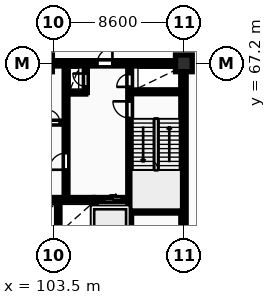
"""IFC4 building model, lengths in metres.
Left out: names, types, materials, properties, quantities, classifications, styles, units other than length and angle.
Written with IfcOpenShell. Run it as: python <this file> out.ifc"""

import sys

from ifc_helpers import new_model, si_unit, direction, frame, frame_2d, origin, origin_2d, place, context, subcontext, project, spatial, rectangle, extrude, element, fill, save


model = new_model("IFC4")
c1 = context("Model", 3, precision=1e-05, world=origin(), true_north=direction((0.0, 1.0)))
c2 = subcontext(c1, "Body", "Model", "MODEL_VIEW")
j1 = project(units=[si_unit("LENGTHUNIT", "METRE"), si_unit("PLANEANGLEUNIT", "RADIAN")], contexts=[c1])
p1 = place(None, origin())
s1 = spatial("IfcSite", under=j1, at=p1, CompositionType="ELEMENT")
p2 = place(p1, origin())
s2 = spatial("IfcBuilding", under=s1, at=p2, CompositionType="ELEMENT")
p3 = place(p2, frame((0.0, 0.0, 5.4)))
s3 = spatial("IfcBuildingStorey", under=s2, at=p3, CompositionType="ELEMENT", Elevation=5.4)
p4 = place(p3, frame((112.1, 67.2, 0.0), z_axis=(0.0, 0.0, 1.0), x_axis=(1.0, 0.0, 0.0)))
e1 = element("IfcColumn", 1, at=p4, inside=s3, PredefinedType="COLUMN", context=c2, shape_type="SweptSolid", body=[
    extrude(rectangle(XDim=1.1, YDim=1.1, at=origin_2d()), origin(), (0.0, 0.0, 1.0), 4.6),
])
p5 = place(p3, frame((112.075, 55.375, 0.0), z_axis=(0.0, 0.0, 1.0), x_axis=(0.0, 1.0, 0.0)))
e2 = element("IfcWall", 2, at=p5, inside=s3, PredefinedType="SHEAR", context=c2, shape_type="SweptSolid", body=[
    extrude(rectangle(XDim=11.65, YDim=0.35, at=frame_2d((5.825, 0.0))), origin(), (0.0, 0.0, 1.0), 4.6),
])
p6 = place(p3, frame((75.95, 67.2, 0.0), z_axis=(0.0, 0.0, 1.0), x_axis=(1.0, 0.0, 0.0)))
e3 = element("IfcWall", 3, at=p6, inside=s3, PredefinedType="SHEAR", context=c2, shape_type="SweptSolid", body=[
    extrude(rectangle(XDim=36.3, YDim=0.35, at=frame_2d((18.15, 0.0))), origin(), (0.0, 0.0, 1.0), 4.6),
])
p7 = place(p6, frame((5.25, 0.0, 0.0)))
e4 = element("IfcOpeningElement", 4, at=p7, cuts=e3, PredefinedType="OPENING", context=c2, shape_type="SweptSolid", body=[
    extrude(rectangle(XDim=1.0, YDim=2.15, at=frame_2d((0.5, 1.075))), frame((0.0, 0.185, 0.0), z_axis=(0.0, -1.0, 0.0), x_axis=(1.0, 0.0, 0.0)), (0.0, 0.0, 1.0), 0.37),
])
p8 = place(p6, frame((22.058, 0.0, 0.0)))
e5 = element("IfcOpeningElement", 5, at=p8, cuts=e3, PredefinedType="OPENING", context=c2, shape_type="SweptSolid", body=[
    extrude(rectangle(XDim=1.5, YDim=2.2, at=frame_2d((0.75, 1.1))), frame((0.0, 0.185, 0.0), z_axis=(0.0, -1.0, 0.0), x_axis=(1.0, 0.0, 0.0)), (0.0, 0.0, 1.0), 0.37),
])
p9 = place(p6, frame((30.45, 0.0, 0.0)))
e6 = element("IfcOpeningElement", 6, at=p9, cuts=e3, PredefinedType="OPENING", context=c2, shape_type="SweptSolid", body=[
    extrude(rectangle(XDim=1.0, YDim=2.15, at=frame_2d((0.5, 1.075))), frame((0.0, 0.185, 0.0), z_axis=(0.0, -1.0, 0.0), x_axis=(1.0, 0.0, 0.0)), (0.0, 0.0, 1.0), 0.37),
])
p10 = place(p3, frame((103.85, 55.4, 0.0), z_axis=(0.0, 0.0, 1.0), x_axis=(0.0, 1.0, 0.0)))
e7 = element("IfcWall", 7, at=p10, inside=s3, PredefinedType="PARTITIONING", context=c2, shape_type="SweptSolid", body=[
    extrude(rectangle(XDim=2.72, YDim=0.2, at=frame_2d((1.36, 0.0))), origin(), (0.0, 0.0, 1.0), 4.3),
])
p11 = place(p3, frame((101.55, 58.25, 0.0), z_axis=(0.0, 0.0, 1.0), x_axis=(1.0, 0.0, 0.0)))
e8 = element("IfcWall", 8, at=p11, inside=s3, PredefinedType="SHEAR", context=c2, shape_type="SweptSolid", body=[
    extrude(rectangle(XDim=4.6, YDim=0.25, at=frame_2d((2.3, 0.0))), origin(), (0.0, 0.0, 1.0), 4.6),
])
p12 = place(p3, frame((106.22, 55.4, 0.0), z_axis=(0.0, 0.0, 1.0), x_axis=(0.0, 1.0, 0.0)))
e9 = element("IfcWall", 9, at=p12, inside=s3, PredefinedType="SHEAR", context=c2, shape_type="SweptSolid", body=[
    extrude(rectangle(XDim=2.85, YDim=0.25, at=frame_2d((1.425, 0.0))), origin(), (0.0, 0.0, 1.0), 4.6),
])
p13 = place(p3, frame((106.22, 58.25, 0.0), z_axis=(0.0, 0.0, 1.0), x_axis=(1.0, 0.0, 0.0)))
e10 = element("IfcWall", 10, at=p13, inside=s3, PredefinedType="SHEAR", context=c2, shape_type="SweptSolid", body=[
    extrude(rectangle(XDim=2.46, YDim=0.25, at=frame_2d((1.23, 0.0))), origin(), (0.0, 0.0, 1.0), 4.6),
])
p14 = place(p13, frame((0.67, 0.0, 0.0)))
e11 = element("IfcOpeningElement", 11, at=p14, cuts=e10, PredefinedType="OPENING", context=c2, shape_type="SweptSolid", body=[
    extrude(rectangle(XDim=1.12, YDim=2.12, at=frame_2d((0.56, 1.06))), frame((0.0, 0.135, 0.0), z_axis=(0.0, -1.0, 0.0), x_axis=(1.0, 0.0, 0.0)), (0.0, 0.0, 1.0), 0.27),
])
p15 = place(p3, frame((84.42, 63.3, 0.0), z_axis=(0.0, 0.0, 1.0), x_axis=(1.0, 0.0, 0.0)))
e12 = element("IfcWall", 12, at=p15, inside=s3, PredefinedType="PARTITIONING", context=c2, shape_type="SweptSolid", body=[
    extrude(rectangle(XDim=19.83, YDim=0.2, at=frame_2d((9.915, 0.0))), origin(), (0.0, 0.0, 1.0), 4.3),
])
p16 = place(p15, frame((1.15, 0.0, 0.0)))
e13 = element("IfcOpeningElement", 13, at=p16, cuts=e12, PredefinedType="OPENING", context=c2, shape_type="SweptSolid", body=[
    extrude(rectangle(XDim=0.85, YDim=2.05, at=frame_2d((0.425, 1.025))), frame((0.0, 0.11, 0.0), z_axis=(0.0, -1.0, 0.0), x_axis=(1.0, 0.0, 0.0)), (0.0, 0.0, 1.0), 0.22),
])
p17 = place(p15, frame((3.25, 0.0, 0.0)))
e14 = element("IfcOpeningElement", 14, at=p17, cuts=e12, PredefinedType="OPENING", context=c2, shape_type="SweptSolid", body=[
    extrude(rectangle(XDim=0.85, YDim=2.05, at=frame_2d((0.425, 1.025))), frame((0.0, 0.11, 0.0), z_axis=(0.0, -1.0, 0.0), x_axis=(1.0, 0.0, 0.0)), (0.0, 0.0, 1.0), 0.22),
])
p18 = place(p15, frame((13.08, 0.0, 0.0)))
e15 = element("IfcOpeningElement", 15, at=p18, cuts=e12, PredefinedType="OPENING", context=c2, shape_type="SweptSolid", body=[
    extrude(rectangle(XDim=1.5, YDim=2.2, at=frame_2d((0.75, 1.1))), frame((0.0, 0.11, 0.0), z_axis=(0.0, -1.0, 0.0), x_axis=(1.0, 0.0, 0.0)), (0.0, 0.0, 1.0), 0.22),
])
p19 = place(p15, frame((5.53, 0.0, 0.0)))
e16 = element("IfcOpeningElement", 16, at=p19, cuts=e12, PredefinedType="OPENING", context=c2, shape_type="SweptSolid", body=[
    extrude(rectangle(XDim=0.88, YDim=2.06, at=frame_2d((0.44, 1.03))), frame((0.0, 0.11, 0.0), z_axis=(0.0, -1.0, 0.0), x_axis=(1.0, 0.0, 0.0)), (0.0, 0.0, 1.0), 0.22),
])
p20 = place(p15, frame((7.68, 0.0, 0.0)))
e17 = element("IfcOpeningElement", 17, at=p20, cuts=e12, PredefinedType="OPENING", context=c2, shape_type="SweptSolid", body=[
    extrude(rectangle(XDim=0.88, YDim=2.06, at=frame_2d((0.44, 1.03))), frame((0.0, 0.11, 0.0), z_axis=(0.0, -1.0, 0.0), x_axis=(1.0, 0.0, 0.0)), (0.0, 0.0, 1.0), 0.22),
])
p21 = place(p15, frame((10.43, 0.0, 0.0)))
e18 = element("IfcOpeningElement", 18, at=p21, cuts=e12, PredefinedType="OPENING", context=c2, shape_type="SweptSolid", body=[
    extrude(rectangle(XDim=0.85, YDim=2.05, at=frame_2d((0.425, 1.025))), frame((0.0, 0.11, 0.0), z_axis=(0.0, -1.0, 0.0), x_axis=(1.0, 0.0, 0.0)), (0.0, 0.0, 1.0), 0.22),
])
p22 = place(p15, frame((16.23, 0.0, 0.0)))
e19 = element("IfcOpeningElement", 19, at=p22, cuts=e12, PredefinedType="OPENING", context=c2, shape_type="SweptSolid", body=[
    extrude(rectangle(XDim=0.96, YDim=2.1, at=frame_2d((0.48, 1.05))), frame((0.0, 0.11, 0.0), z_axis=(0.0, -1.0, 0.0), x_axis=(1.0, 0.0, 0.0)), (0.0, 0.0, 1.0), 0.22),
])
p23 = place(p15, frame((18.68, 0.0, 0.0)))
e20 = element("IfcOpeningElement", 20, at=p23, cuts=e12, PredefinedType="OPENING", context=c2, shape_type="SweptSolid", body=[
    extrude(rectangle(XDim=0.84, YDim=2.04, at=frame_2d((0.42, 1.02))), frame((0.0, 0.11, 0.0), z_axis=(0.0, -1.0, 0.0), x_axis=(1.0, 0.0, 0.0)), (0.0, 0.0, 1.0), 0.22),
])
p24 = place(p3, frame((104.45, 65.28, 0.0), z_axis=(0.0, 0.0, 1.0), x_axis=(1.0, 0.0, 0.0)))
e21 = element("IfcWall", 21, at=p24, inside=s3, PredefinedType="PARTITIONING", context=c2, shape_type="SweptSolid", body=[
    extrude(rectangle(XDim=1.2, YDim=0.2, at=frame_2d((0.6, 0.0))), origin(), (0.0, 0.0, 1.0), 4.3),
])
p25 = place(p3, frame((105.65, 65.28, 0.0), z_axis=(0.0, 0.0, 1.0), x_axis=(0.0, 1.0, 0.0)))
e22 = element("IfcWall", 22, at=p25, inside=s3, PredefinedType="PARTITIONING", context=c2, shape_type="SweptSolid", body=[
    extrude(rectangle(XDim=1.72, YDim=0.2, at=frame_2d((0.86, 0.0))), origin(), (0.0, 0.0, 1.0), 4.3),
])
p26 = place(p25, frame((0.4, 0.0, 0.0)))
e23 = element("IfcOpeningElement", 23, at=p26, cuts=e22, PredefinedType="OPENING", context=c2, shape_type="SweptSolid", body=[
    extrude(rectangle(XDim=0.85, YDim=2.05, at=frame_2d((0.425, 1.025))), frame((0.0, 0.11, 0.0), z_axis=(0.0, -1.0, 0.0), x_axis=(1.0, 0.0, 0.0)), (0.0, 0.0, 1.0), 0.22),
])
p27 = place(p3, frame((104.35, 58.4, 0.0), z_axis=(0.0, 0.0, 1.0), x_axis=(0.0, 1.0, 0.0)))
e24 = element("IfcWall", 24, at=p27, inside=s3, PredefinedType="SHEAR", context=c2, shape_type="SweptSolid", body=[
    extrude(rectangle(XDim=8.6, YDim=0.25, at=frame_2d((4.3, 0.0))), origin(), (0.0, 0.0, 1.0), 4.6),
])
p28 = place(p27, frame((1.8, 0.0, 0.0)))
e25 = element("IfcOpeningElement", 25, at=p28, cuts=e24, PredefinedType="OPENING", context=c2, shape_type="SweptSolid", body=[
    extrude(rectangle(XDim=1.1, YDim=2.1, at=frame_2d((0.55, 1.05))), frame((0.0, 0.135, 0.0), z_axis=(0.0, -1.0, 0.0), x_axis=(1.0, 0.0, 0.0)), (0.0, 0.0, 1.0), 0.27),
])
p29 = place(p3, frame((108.535, 55.4, 0.0), z_axis=(0.0, 0.0, 1.0), x_axis=(0.0, 1.0, 0.0)))
e26 = element("IfcWall", 26, at=p29, inside=s3, PredefinedType="SHEAR", context=c2, shape_type="SweptSolid", body=[
    extrude(rectangle(XDim=11.6, YDim=0.25, at=frame_2d((5.8, 0.0))), origin(), (0.0, 0.0, 1.0), 4.6),
])
p30 = place(p29, frame((8.2, 0.0, 0.0)))
e27 = element("IfcOpeningElement", 27, at=p30, cuts=e26, PredefinedType="OPENING", context=c2, shape_type="SweptSolid", body=[
    extrude(rectangle(XDim=1.1, YDim=2.1, at=frame_2d((0.55, 1.05))), frame((0.0, 0.135, 0.0), z_axis=(0.0, -1.0, 0.0), x_axis=(1.0, 0.0, 0.0)), (0.0, 0.0, 1.0), 0.27),
])
p31 = place(p29, frame((10.25, 0.0, 0.0)))
e28 = element("IfcOpeningElement", 28, at=p31, cuts=e26, PredefinedType="OPENING", context=c2, shape_type="SweptSolid", body=[
    extrude(rectangle(XDim=0.85, YDim=2.05, at=frame_2d((0.425, 1.025))), frame((0.0, 0.135, 0.0), z_axis=(0.0, -1.0, 0.0), x_axis=(1.0, 0.0, 0.0)), (0.0, 0.0, 1.0), 0.27),
])
for number, where, z_axis, x_axis in (
    (29, (108.66, 57.475, 0.0), (0.0, 0.0, 1.0), (1.0, 0.0, 0.0)),
    (30, (108.66, 65.325, 0.0), (0.0, 0.0, 1.0), (1.0, 0.0, 0.0)),
):
    element("IfcWall", number, at=place(p3, frame(where, z_axis=z_axis, x_axis=x_axis)), inside=s3, PredefinedType="SHEAR", context=c2, shape_type="SweptSolid", body=[
        extrude(rectangle(XDim=3.24, YDim=0.25, at=frame_2d((1.62, 0.0))), origin(), (0.0, 0.0, 1.0), 4.6),
    ])
p32 = place(p9, origin())
e31 = element("IfcDoor", 31, at=p32, inside=s3, OperationType="SINGLE_SWING_RIGHT", PredefinedType="DOOR", context=c2, shape_type="SweptSolid", body=[
    extrude(rectangle(XDim=1.0, YDim=2.15, at=frame_2d((0.5, 1.075))), frame((0.0, 0.025, 0.0), z_axis=(0.0, -1.0, 0.0), x_axis=(1.0, 0.0, 0.0)), (0.0, 0.0, 1.0), 0.05),
])
fill(e6, e31)
p33 = place(p14, origin())
e32 = element("IfcDoor", 32, at=p33, inside=s3, OperationType="SLIDING_TO_RIGHT", PredefinedType="DOOR", context=c2, shape_type="SweptSolid", body=[
    extrude(rectangle(XDim=1.12, YDim=2.12, at=frame_2d((0.56, 1.06))), frame((0.0, 0.025, 0.0), z_axis=(0.0, -1.0, 0.0), x_axis=(1.0, 0.0, 0.0)), (0.0, 0.0, 1.0), 0.05),
])
fill(e11, e32)
p34 = place(p23, origin())
e33 = element("IfcDoor", 33, at=p34, inside=s3, OperationType="SINGLE_SWING_LEFT", PredefinedType="DOOR", context=c2, shape_type="SweptSolid", body=[
    extrude(rectangle(XDim=0.84, YDim=2.04, at=frame_2d((0.42, 1.02))), frame((0.0, 0.025, 0.0), z_axis=(0.0, -1.0, 0.0), x_axis=(1.0, 0.0, 0.0)), (0.0, 0.0, 1.0), 0.05),
])
fill(e20, e33)
p35 = place(p26, origin())
e34 = element("IfcDoor", 34, at=p35, inside=s3, OperationType="SINGLE_SWING_RIGHT", PredefinedType="DOOR", context=c2, shape_type="SweptSolid", body=[
    extrude(rectangle(XDim=0.85, YDim=2.05, at=frame_2d((0.425, 1.025))), frame((0.0, 0.025, 0.0), z_axis=(0.0, -1.0, 0.0), x_axis=(1.0, 0.0, 0.0)), (0.0, 0.0, 1.0), 0.05),
])
fill(e23, e34)
p36 = place(p28, origin())
e35 = element("IfcDoor", 35, at=p36, inside=s3, OperationType="SINGLE_SWING_LEFT", PredefinedType="DOOR", context=c2, shape_type="SweptSolid", body=[
    extrude(rectangle(XDim=1.1, YDim=2.1, at=frame_2d((0.55, 1.05))), frame((0.0, 0.025, 0.0), z_axis=(0.0, -1.0, 0.0), x_axis=(1.0, 0.0, 0.0)), (0.0, 0.0, 1.0), 0.05),
])
fill(e25, e35)
p37 = place(p30, origin())
e36 = element("IfcDoor", 36, at=p37, inside=s3, OperationType="SINGLE_SWING_RIGHT", PredefinedType="DOOR", context=c2, shape_type="SweptSolid", body=[
    extrude(rectangle(XDim=1.1, YDim=2.1, at=frame_2d((0.55, 1.05))), frame((0.0, 0.025, 0.0), z_axis=(0.0, -1.0, 0.0), x_axis=(1.0, 0.0, 0.0)), (0.0, 0.0, 1.0), 0.05),
])
fill(e27, e36)
p38 = place(p31, origin())
e37 = element("IfcDoor", 37, at=p38, inside=s3, OperationType="SINGLE_SWING_LEFT", PredefinedType="DOOR", context=c2, shape_type="SweptSolid", body=[
    extrude(rectangle(XDim=0.85, YDim=2.05, at=frame_2d((0.425, 1.025))), frame((0.0, 0.025, 0.0), z_axis=(0.0, -1.0, 0.0), x_axis=(1.0, 0.0, 0.0)), (0.0, 0.0, 1.0), 0.05),
])
fill(e28, e37)
save(model, sys.argv[1])
